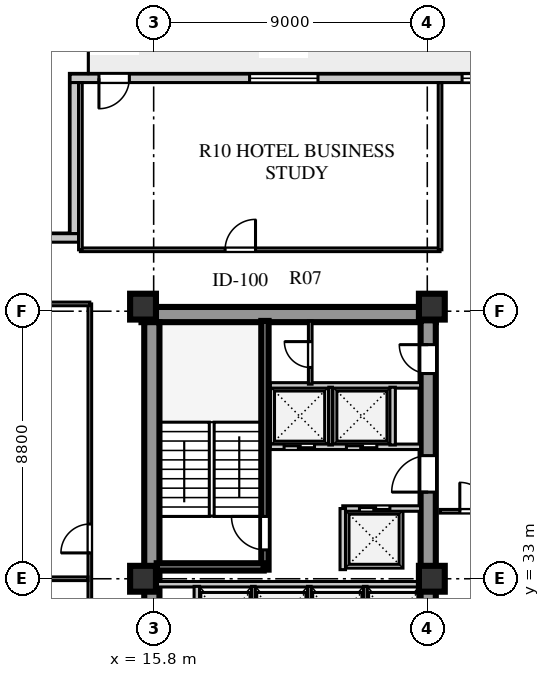
"""IFC4 building model, lengths in metres.
Left out: names, types, materials, properties, quantities, classifications, styles, units other than length and angle.
Written with IfcOpenShell. Run it as: python <this file> out.ifc"""

import sys

from ifc_helpers import new_model, si_unit, direction, frame, frame_2d, origin, origin_2d, place, context, subcontext, project, spatial, rectangle, extrude, element, fill, save


model = new_model("IFC4")
c1 = context("Model", 3, precision=1e-05, world=origin(), true_north=direction((0.0, 1.0)))
c2 = subcontext(c1, "Body", "Model", "MODEL_VIEW")
j1 = project(units=[si_unit("LENGTHUNIT", "METRE"), si_unit("PLANEANGLEUNIT", "RADIAN")], contexts=[c1])
p1 = place(None, origin())
s1 = spatial("IfcSite", under=j1, at=p1, CompositionType="ELEMENT")
p2 = place(p1, origin())
s2 = spatial("IfcBuilding", under=s1, at=p2, CompositionType="ELEMENT")
p3 = place(p2, frame((0.0, 0.0, 181.0)))
s3 = spatial("IfcBuildingStorey", under=s2, at=p3, CompositionType="ELEMENT", Elevation=181.0)
p4 = place(p3, frame((15.4, 41.69, 0.0), z_axis=(0.0, 0.0, 1.0), x_axis=(1.0, 0.0, 0.0)))
e1 = element("IfcWall", 1, at=p4, inside=s3, PredefinedType="SHEAR", context=c2, shape_type="SweptSolid", body=[
    extrude(rectangle(XDim=9.68, YDim=0.5, at=frame_2d((4.84, 0.0))), origin(), (0.0, 0.0, 1.0), 3.6),
])
p5 = place(p3, frame((15.74, 15.81, 0.0), z_axis=(0.0, 0.0, 1.0), x_axis=(0.0, 1.0, 0.0)))
e2 = element("IfcWall", 2, at=p5, inside=s3, PredefinedType="SHEAR", context=c2, shape_type="SweptSolid", body=[
    extrude(rectangle(XDim=25.63, YDim=0.5, at=frame_2d((12.815, 0.0))), origin(), (0.0, 0.0, 1.0), 3.6),
])
p6 = place(p3, frame((24.83, 15.74, 0.0), z_axis=(0.0, 0.0, 1.0), x_axis=(0.0, 1.0, 0.0)))
e3 = element("IfcWall", 3, at=p6, inside=s3, PredefinedType="SHEAR", context=c2, shape_type="SweptSolid", body=[
    extrude(rectangle(XDim=25.76, YDim=0.5, at=frame_2d((12.88, 0.0))), origin(), (0.0, 0.0, 1.0), 3.6),
])
p7 = place(p6, frame((1.61, 0.0, 0.0)))
e4 = element("IfcOpeningElement", 4, at=p7, cuts=e3, PredefinedType="OPENING", context=c2, shape_type="SweptSolid", body=[
    extrude(rectangle(XDim=1.2, YDim=2.1, at=frame_2d((0.6, 1.05))), frame((0.0, 0.26, 0.0), z_axis=(0.0, -1.0, 0.0), x_axis=(1.0, 0.0, 0.0)), (0.0, 0.0, 1.0), 0.52),
])
p8 = place(p6, frame((6.78, 0.0, 0.0)))
e5 = element("IfcOpeningElement", 5, at=p8, cuts=e3, PredefinedType="OPENING", context=c2, shape_type="SweptSolid", body=[
    extrude(rectangle(XDim=0.85, YDim=2.06, at=frame_2d((0.425, 1.03))), frame((0.0, 0.26, 0.0), z_axis=(0.0, -1.0, 0.0), x_axis=(1.0, 0.0, 0.0)), (0.0, 0.0, 1.0), 0.52),
])
p9 = place(p6, frame((12.11, 0.0, 0.0)))
e6 = element("IfcOpeningElement", 6, at=p9, cuts=e3, PredefinedType="OPENING", context=c2, shape_type="SweptSolid", body=[
    extrude(rectangle(XDim=1.5, YDim=2.12, at=frame_2d((0.75, 1.06))), frame((0.0, 0.26, 0.0), z_axis=(0.0, -1.0, 0.0), x_axis=(1.0, 0.0, 0.0)), (0.0, 0.0, 1.0), 0.52),
])
p10 = place(p6, frame((20.11, 0.0, 0.0)))
e7 = element("IfcOpeningElement", 7, at=p10, cuts=e3, PredefinedType="OPENING", context=c2, shape_type="SweptSolid", body=[
    extrude(rectangle(XDim=1.2, YDim=2.12, at=frame_2d((0.6, 1.06))), frame((0.0, 0.26, 0.0), z_axis=(0.0, -1.0, 0.0), x_axis=(1.0, 0.0, 0.0)), (0.0, 0.0, 1.0), 0.52),
])
p11 = place(p6, frame((24.01, 0.0, 0.0)))
e8 = element("IfcOpeningElement", 8, at=p11, cuts=e3, PredefinedType="OPENING", context=c2, shape_type="SweptSolid", body=[
    extrude(rectangle(XDim=0.95, YDim=2.1, at=frame_2d((0.475, 1.05))), frame((0.0, 0.26, 0.0), z_axis=(0.0, -1.0, 0.0), x_axis=(1.0, 0.0, 0.0)), (0.0, 0.0, 1.0), 0.52),
])
for number, where, z_axis, x_axis in (
    (9, (15.45, 33.0, 0.0), (0.0, 0.0, 1.0), (1.0, 0.0, 0.0)),
    (10, (15.45, 41.95, 0.0), (0.0, 0.0, 1.0), (1.0, 0.0, 0.0)),
    (11, (24.95, 33.0, 0.0), (0.0, 0.0, 1.0), (1.0, 0.0, 0.0)),
    (12, (24.95, 41.95, 0.0), (0.0, 0.0, 1.0), (1.0, 0.0, 0.0)),
):
    element("IfcColumn", number, at=place(p3, frame(where, z_axis=z_axis, x_axis=x_axis)), inside=s3, PredefinedType="COLUMN", context=c2, shape_type="SweptSolid", body=[
        extrude(rectangle(XDim=0.85, YDim=0.85, at=origin_2d()), origin(), (0.0, 0.0, 1.0), 3.6),
    ])
p12 = place(p3, frame((45.55, 49.46, 0.0), z_axis=(0.0, 0.0, 1.0), x_axis=(-1.0, 0.0, 0.0)))
e13 = element("IfcWall", 13, at=p12, inside=s3, PredefinedType="STANDARD", context=c2, shape_type="SweptSolid", body=[
    extrude(rectangle(XDim=32.5, YDim=0.28, at=frame_2d((16.25, 0.0))), origin(), (0.0, 0.0, 1.0), 3.6),
])
p13 = place(p12, frame((30.55, 0.0, 0.0)))
e14 = element("IfcOpeningElement", 14, at=p13, cuts=e13, PredefinedType="OPENING", context=c2, shape_type="SweptSolid", body=[
    extrude(rectangle(XDim=1.0, YDim=2.05, at=frame_2d((0.5, 1.025))), frame((0.0, 0.15, 0.0), z_axis=(0.0, -1.0, 0.0), x_axis=(1.0, 0.0, 0.0)), (0.0, 0.0, 1.0), 0.3),
])
p14 = place(p12, frame((24.345, 0.0, 0.8)))
e15 = element("IfcOpeningElement", 15, at=p14, cuts=e13, PredefinedType="OPENING", context=c2, shape_type="SweptSolid", body=[
    extrude(rectangle(XDim=2.25, YDim=2.0, at=frame_2d((1.125, 1.0))), frame((0.0, 0.15, 0.0), z_axis=(0.0, -1.0, 0.0), x_axis=(1.0, 0.0, 0.0)), (0.0, 0.0, 1.0), 0.3),
])
p15 = place(p12, frame((18.405, 0.0, 0.8)))
e16 = element("IfcOpeningElement", 16, at=p15, cuts=e13, PredefinedType="OPENING", context=c2, shape_type="SweptSolid", body=[
    extrude(rectangle(XDim=1.2, YDim=1.75, at=frame_2d((0.6, 0.875))), frame((0.0, 0.15, 0.0), z_axis=(0.0, -1.0, 0.0), x_axis=(1.0, 0.0, 0.0)), (0.0, 0.0, 1.0), 0.3),
])
p16 = place(p12, frame((16.015, 0.0, 0.8)))
e17 = element("IfcOpeningElement", 17, at=p16, cuts=e13, PredefinedType="OPENING", context=c2, shape_type="SweptSolid", body=[
    extrude(rectangle(XDim=1.2, YDim=1.75, at=frame_2d((0.6, 0.875))), frame((0.0, 0.15, 0.0), z_axis=(0.0, -1.0, 0.0), x_axis=(1.0, 0.0, 0.0)), (0.0, 0.0, 1.0), 0.3),
])
p17 = place(p12, frame((12.59, 0.0, 0.8)))
e18 = element("IfcOpeningElement", 18, at=p17, cuts=e13, PredefinedType="OPENING", context=c2, shape_type="SweptSolid", body=[
    extrude(rectangle(XDim=1.2, YDim=1.75, at=frame_2d((0.6, 0.875))), frame((0.0, 0.15, 0.0), z_axis=(0.0, -1.0, 0.0), x_axis=(1.0, 0.0, 0.0)), (0.0, 0.0, 1.0), 0.3),
])
p18 = place(p12, frame((6.58, 0.0, 0.8)))
e19 = element("IfcOpeningElement", 19, at=p18, cuts=e13, PredefinedType="OPENING", context=c2, shape_type="SweptSolid", body=[
    extrude(rectangle(XDim=2.4, YDim=2.05, at=frame_2d((1.2, 1.025))), frame((0.0, 0.15, 0.0), z_axis=(0.0, -1.0, 0.0), x_axis=(1.0, 0.0, 0.0)), (0.0, 0.0, 1.0), 0.3),
])
p19 = place(p12, frame((1.37, 0.0, 0.8)))
e20 = element("IfcOpeningElement", 20, at=p19, cuts=e13, PredefinedType="OPENING", context=c2, shape_type="SweptSolid", body=[
    extrude(rectangle(XDim=2.1, YDim=1.95, at=frame_2d((1.05, 0.975))), frame((0.0, 0.15, 0.0), z_axis=(0.0, -1.0, 0.0), x_axis=(1.0, 0.0, 0.0)), (0.0, 0.0, 1.0), 0.3),
])
p20 = place(p3, frame((13.19, 49.32, 0.0), z_axis=(0.0, 0.0, 1.0), x_axis=(0.0, -1.0, 0.0)))
e21 = element("IfcWall", 21, at=p20, inside=s3, PredefinedType="STANDARD", context=c2, shape_type="SweptSolid", body=[
    extrude(rectangle(XDim=4.97, YDim=0.28, at=frame_2d((2.485, 0.0))), origin(), (0.0, 0.0, 1.0), 3.6),
])
p21 = place(p3, frame((13.33, 44.21, 0.0), z_axis=(0.0, 0.0, 1.0), x_axis=(-1.0, 0.0, 0.0)))
e22 = element("IfcWall", 22, at=p21, inside=s3, PredefinedType="STANDARD", context=c2, shape_type="SweptSolid", body=[
    extrude(rectangle(XDim=5.53, YDim=0.28, at=frame_2d((2.765, 0.0))), origin(), (0.0, 0.0, 1.0), 3.6),
])
p22 = place(p3, frame((15.9, 32.82, 0.0), z_axis=(0.0, 0.0, 1.0), x_axis=(1.0, 0.0, 0.0)))
e23 = element("IfcWall", 23, at=p22, inside=s3, PredefinedType="SOLIDWALL", context=c2, shape_type="SweptSolid", body=[
    extrude(rectangle(XDim=8.68, YDim=0.18, at=frame_2d((4.34, 0.0))), origin(), (0.0, 0.0, 1.0), 2.95),
])
p23 = place(p3, frame((17.22, 30.7, 0.0), z_axis=(0.0, 0.0, 1.0), x_axis=(0.0, 1.0, 0.0)))
e24 = element("IfcWall", 24, at=p23, inside=s3, PredefinedType="SOLIDWALL", context=c2, shape_type="SweptSolid", body=[
    extrude(rectangle(XDim=2.05, YDim=0.18, at=frame_2d((1.025, 0.0))), origin(), (0.0, 0.0, 1.0), 3.6),
])
for number, where, z_axis, x_axis in (
    (25, (19.08, 30.7, 0.0), (0.0, 0.0, 1.0), (0.0, 1.0, 0.0)),
    (26, (20.92, 30.7, 0.0), (0.0, 0.0, 1.0), (0.0, 1.0, 0.0)),
    (27, (22.76, 30.7, 0.0), (0.0, 0.0, 1.0), (0.0, 1.0, 0.0)),
):
    element("IfcWall", number, at=place(p3, frame(where, z_axis=z_axis, x_axis=x_axis)), inside=s3, PredefinedType="PARTITIONING", context=c2, shape_type="SweptSolid", body=[
        extrude(rectangle(XDim=2.05, YDim=0.12, at=frame_2d((1.025, 0.0))), origin(), (0.0, 0.0, 1.0), 3.6),
    ])
p24 = place(p3, frame((19.46, 33.3, 0.0), z_axis=(0.0, 0.0, 1.0), x_axis=(0.0, 1.0, 0.0)))
e28 = element("IfcWall", 28, at=p24, inside=s3, PredefinedType="SHEAR", context=c2, shape_type="SweptSolid", body=[
    extrude(rectangle(XDim=8.18, YDim=0.24, at=frame_2d((4.09, 0.0))), origin(), (0.0, 0.0, 1.0), 3.85),
])
p25 = place(p24, frame((0.65, 0.0, 0.0)))
e29 = element("IfcOpeningElement", 29, at=p25, cuts=e28, PredefinedType="OPENING", context=c2, shape_type="SweptSolid", body=[
    extrude(rectangle(XDim=1.1, YDim=2.1, at=frame_2d((0.55, 1.05))), frame((0.0, 0.13, 0.0), z_axis=(0.0, -1.0, 0.0), x_axis=(1.0, 0.0, 0.0)), (0.0, 0.0, 1.0), 0.26),
])
p26 = place(p3, frame((15.9, 33.39, 0.0), z_axis=(0.0, 0.0, 1.0), x_axis=(1.0, 0.0, 0.0)))
e30 = element("IfcWall", 30, at=p26, inside=s3, PredefinedType="SHEAR", context=c2, shape_type="SweptSolid", body=[
    extrude(rectangle(XDim=3.52, YDim=0.24, at=frame_2d((1.76, 0.0))), origin(), (0.0, 0.0, 1.0), 3.85),
])
p27 = place(p3, frame((22.02, 35.31, 0.0), z_axis=(0.0, 0.0, 1.0), x_axis=(1.0, 0.0, 0.0)))
e31 = element("IfcWall", 31, at=p27, inside=s3, PredefinedType="SOLIDWALL", context=c2, shape_type="SweptSolid", body=[
    extrude(rectangle(XDim=2.56, YDim=0.18, at=frame_2d((1.28, 0.0))), origin(), (0.0, 0.0, 1.0), 3.6),
])
p28 = place(p27, frame((0.55, 0.0, 0.0)))
e32 = element("IfcOpeningElement", 32, at=p28, cuts=e31, PredefinedType="OPENING", context=c2, shape_type="SweptSolid", body=[
    extrude(rectangle(XDim=1.0, YDim=2.1, at=frame_2d((0.5, 1.05))), frame((0.0, 0.1, 0.0), z_axis=(0.0, -1.0, 0.0), x_axis=(1.0, 0.0, 0.0)), (0.0, 0.0, 1.0), 0.2),
])
p29 = place(p3, frame((22.02, 33.3, 0.0), z_axis=(0.0, 0.0, 1.0), x_axis=(0.0, 1.0, 0.0)))
e33 = element("IfcWall", 33, at=p29, inside=s3, PredefinedType="SOLIDWALL", context=c2, shape_type="SweptSolid", body=[
    extrude(rectangle(XDim=2.01, YDim=0.18, at=frame_2d((1.005, 0.0))), origin(), (0.0, 0.0, 1.0), 3.6),
])
p30 = place(p3, frame((19.64, 37.34, 0.0), z_axis=(0.0, 0.0, 1.0), x_axis=(1.0, 0.0, 0.0)))
e34 = element("IfcWall", 34, at=p30, inside=s3, PredefinedType="SOLIDWALL", context=c2, shape_type="SweptSolid", body=[
    extrude(rectangle(XDim=4.94, YDim=0.18, at=frame_2d((2.47, 0.0))), origin(), (0.0, 0.0, 1.0), 3.6),
])
p31 = place(p30, frame((0.45, 0.0, 0.0)))
e35 = element("IfcOpeningElement", 35, at=p31, cuts=e34, PredefinedType="OPENING", context=c2, shape_type="SweptSolid", body=[
    extrude(rectangle(XDim=1.0, YDim=2.1, at=frame_2d((0.5, 1.05))), frame((0.0, 0.1, 0.0), z_axis=(0.0, -1.0, 0.0), x_axis=(1.0, 0.0, 0.0)), (0.0, 0.0, 1.0), 0.2),
])
p32 = place(p30, frame((2.5, 0.0, 0.0)))
e36 = element("IfcOpeningElement", 36, at=p32, cuts=e34, PredefinedType="OPENING", context=c2, shape_type="SweptSolid", body=[
    extrude(rectangle(XDim=1.0, YDim=2.1, at=frame_2d((0.5, 1.05))), frame((0.0, 0.1, 0.0), z_axis=(0.0, -1.0, 0.0), x_axis=(1.0, 0.0, 0.0)), (0.0, 0.0, 1.0), 0.2),
])
p33 = place(p3, frame((19.64, 39.36, 0.0), z_axis=(0.0, 0.0, 1.0), x_axis=(1.0, 0.0, 0.0)))
e37 = element("IfcWall", 37, at=p33, inside=s3, PredefinedType="SOLIDWALL", context=c2, shape_type="SweptSolid", body=[
    extrude(rectangle(XDim=4.94, YDim=0.18, at=frame_2d((2.47, 0.0))), origin(), (0.0, 0.0, 1.0), 3.6),
])
p34 = place(p3, frame((21.62, 37.4, 0.0), z_axis=(0.0, 0.0, 1.0), x_axis=(0.0, 1.0, 0.0)))
e38 = element("IfcWall", 38, at=p34, inside=s3, PredefinedType="PARTITIONING", context=c2, shape_type="SweptSolid", body=[
    extrude(rectangle(XDim=1.9, YDim=0.12, at=frame_2d((0.95, 0.0))), origin(), (0.0, 0.0, 1.0), 3.6),
])
p35 = place(p3, frame((23.66, 37.4, 0.0), z_axis=(0.0, 0.0, 1.0), x_axis=(0.0, 1.0, 0.0)))
e39 = element("IfcWall", 39, at=p35, inside=s3, PredefinedType="SOLIDWALL", context=c2, shape_type="SweptSolid", body=[
    extrude(rectangle(XDim=1.9, YDim=0.18, at=frame_2d((0.95, 0.0))), origin(), (0.0, 0.0, 1.0), 3.6),
])
p36 = place(p3, frame((20.95, 39.4, 0.0), z_axis=(0.0, 0.0, 1.0), x_axis=(0.0, 1.0, 0.0)))
e40 = element("IfcWall", 40, at=p36, inside=s3, PredefinedType="PARTITIONING", context=c2, shape_type="SweptSolid", body=[
    extrude(rectangle(XDim=2.08, YDim=0.12, at=frame_2d((1.04, 0.0))), origin(), (0.0, 0.0, 1.0), 3.6),
])
p37 = place(p36, frame((0.55, 0.0, 0.0)))
e41 = element("IfcOpeningElement", 41, at=p37, cuts=e40, PredefinedType="OPENING", context=c2, shape_type="SweptSolid", body=[
    extrude(rectangle(XDim=0.85, YDim=2.06, at=frame_2d((0.425, 1.03))), frame((0.0, 0.07, 0.0), z_axis=(0.0, -1.0, 0.0), x_axis=(1.0, 0.0, 0.0)), (0.0, 0.0, 1.0), 0.14),
])
p38 = place(p3, frame((25.22, 35.22, 0.0), z_axis=(0.0, 0.0, 1.0), x_axis=(1.0, 0.0, 0.0)))
e42 = element("IfcWall", 42, at=p38, inside=s3, PredefinedType="PARTITIONING", context=c2, shape_type="SweptSolid", body=[
    extrude(rectangle(XDim=9.5, YDim=0.12, at=frame_2d((4.75, 0.0))), origin(), (0.0, 0.0, 1.0), 3.6),
])
p39 = place(p38, frame((0.65, 0.0, 0.0)))
e43 = element("IfcOpeningElement", 43, at=p39, cuts=e42, PredefinedType="OPENING", context=c2, shape_type="SweptSolid", body=[
    extrude(rectangle(XDim=0.95, YDim=2.1, at=frame_2d((0.475, 1.05))), frame((0.0, 0.07, 0.0), z_axis=(0.0, -1.0, 0.0), x_axis=(1.0, 0.0, 0.0)), (0.0, 0.0, 1.0), 0.14),
])
p40 = place(p38, frame((5.4, 0.0, 0.0)))
e44 = element("IfcOpeningElement", 44, at=p40, cuts=e42, PredefinedType="OPENING", context=c2, shape_type="SweptSolid", body=[
    extrude(rectangle(XDim=1.05, YDim=2.1, at=frame_2d((0.525, 1.05))), frame((0.0, 0.07, 0.0), z_axis=(0.0, -1.0, 0.0), x_axis=(1.0, 0.0, 0.0)), (0.0, 0.0, 1.0), 0.14),
])
p41 = place(p3, frame((13.7, 15.16, 0.0), z_axis=(0.0, 0.0, 1.0), x_axis=(0.0, 1.0, 0.0)))
e45 = element("IfcWall", 45, at=p41, inside=s3, PredefinedType="PARTITIONING", context=c2, shape_type="SweptSolid", body=[
    extrude(rectangle(XDim=26.88, YDim=0.12, at=frame_2d((13.44, 0.0))), origin(), (0.0, 0.0, 1.0), 3.6),
])
p42 = place(p41, frame((0.91, 0.0, 0.0)))
e46 = element("IfcOpeningElement", 46, at=p42, cuts=e45, PredefinedType="OPENING", context=c2, shape_type="SweptSolid", body=[
    extrude(rectangle(XDim=0.95, YDim=2.1, at=frame_2d((0.475, 1.05))), frame((0.0, 0.07, 0.0), z_axis=(0.0, -1.0, 0.0), x_axis=(1.0, 0.0, 0.0)), (0.0, 0.0, 1.0), 0.14),
])
p43 = place(p41, frame((9.84, 0.0, 0.0)))
e47 = element("IfcOpeningElement", 47, at=p43, cuts=e45, PredefinedType="OPENING", context=c2, shape_type="SweptSolid", body=[
    extrude(rectangle(XDim=0.95, YDim=2.1, at=frame_2d((0.475, 1.05))), frame((0.0, 0.07, 0.0), z_axis=(0.0, -1.0, 0.0), x_axis=(1.0, 0.0, 0.0)), (0.0, 0.0, 1.0), 0.14),
])
p44 = place(p41, frame((18.69, 0.0, 0.0)))
e48 = element("IfcOpeningElement", 48, at=p44, cuts=e45, PredefinedType="OPENING", context=c2, shape_type="SweptSolid", body=[
    extrude(rectangle(XDim=0.95, YDim=2.1, at=frame_2d((0.475, 1.05))), frame((0.0, 0.07, 0.0), z_axis=(0.0, -1.0, 0.0), x_axis=(1.0, 0.0, 0.0)), (0.0, 0.0, 1.0), 0.14),
])
p45 = place(p3, frame((8.08, 42.04, 0.0), z_axis=(0.0, 0.0, 1.0), x_axis=(1.0, 0.0, 0.0)))
e49 = element("IfcWall", 49, at=p45, inside=s3, PredefinedType="PARTITIONING", context=c2, shape_type="SweptSolid", body=[
    extrude(rectangle(XDim=5.62, YDim=0.12, at=frame_2d((2.81, 0.0))), origin(), (0.0, 0.0, 1.0), 3.15),
])
p46 = place(p3, frame((13.39, 43.82, 0.0), z_axis=(0.0, 0.0, 1.0), x_axis=(1.0, 0.0, 0.0)))
e50 = element("IfcWall", 50, at=p46, inside=s3, PredefinedType="PARTITIONING", context=c2, shape_type="SweptSolid", body=[
    extrude(rectangle(XDim=11.83, YDim=0.12, at=frame_2d((5.915, 0.0))), origin(), (0.0, 0.0, 1.0), 3.6),
])
p47 = place(p46, frame((4.76, 0.0, 0.0)))
e51 = element("IfcOpeningElement", 51, at=p47, cuts=e50, PredefinedType="OPENING", context=c2, shape_type="SweptSolid", body=[
    extrude(rectangle(XDim=1.0, YDim=2.08, at=frame_2d((0.5, 1.04))), frame((0.0, 0.07, 0.0), z_axis=(0.0, -1.0, 0.0), x_axis=(1.0, 0.0, 0.0)), (0.0, 0.0, 1.0), 0.14),
])
p48 = place(p3, frame((13.39, 43.82, 0.0), z_axis=(0.0, 0.0, 1.0), x_axis=(0.0, 1.0, 0.0)))
e52 = element("IfcWall", 52, at=p48, inside=s3, PredefinedType="PARTITIONING", context=c2, shape_type="SweptSolid", body=[
    extrude(rectangle(XDim=5.5, YDim=0.12, at=frame_2d((2.75, 0.0))), origin(), (0.0, 0.0, 1.0), 3.6),
])
p49 = place(p3, frame((25.22, 43.82, 0.0), z_axis=(0.0, 0.0, 1.0), x_axis=(0.0, 1.0, 0.0)))
e53 = element("IfcWall", 53, at=p49, inside=s3, PredefinedType="PARTITIONING", context=c2, shape_type="SweptSolid", body=[
    extrude(rectangle(XDim=5.5, YDim=0.12, at=frame_2d((2.75, 0.0))), origin(), (0.0, 0.0, 1.0), 3.15),
])
p50 = place(p3, frame((8.08, 33.0, 0.0), z_axis=(0.0, 0.0, 1.0), x_axis=(1.0, 0.0, 0.0)))
e54 = element("IfcWall", 54, at=p50, inside=s3, PredefinedType="PARTITIONING", context=c2, shape_type="SweptSolid", body=[
    extrude(rectangle(XDim=5.56, YDim=0.12, at=frame_2d((2.78, 0.0))), origin(), (0.0, 0.0, 1.0), 3.15),
])
p51 = place(p13, frame((1.0, 0.0, 0.0), z_axis=(0.0, 0.0, 1.0), x_axis=(-1.0, 0.0, 0.0)))
e55 = element("IfcDoor", 55, at=p51, inside=s3, OperationType="SINGLE_SWING_LEFT", PredefinedType="DOOR", context=c2, shape_type="SweptSolid", body=[
    extrude(rectangle(XDim=1.0, YDim=2.05, at=frame_2d((0.5, 1.025))), frame((0.0, 0.025, 0.0), z_axis=(0.0, -1.0, 0.0), x_axis=(1.0, 0.0, 0.0)), (0.0, 0.0, 1.0), 0.05),
])
fill(e14, e55)
p52 = place(p14, origin())
e56 = element("IfcWindow", 56, at=p52, inside=s3, PartitioningType="SINGLE_PANEL", PredefinedType="WINDOW", context=c2, shape_type="SweptSolid", body=[
    extrude(rectangle(XDim=2.25, YDim=2.0, at=frame_2d((1.125, 1.0))), frame((0.0, 0.03, 0.0), z_axis=(0.0, -1.0, 0.0), x_axis=(1.0, 0.0, 0.0)), (0.0, 0.0, 1.0), 0.06),
])
fill(e15, e56)
p53 = place(p15, origin())
e57 = element("IfcWindow", 57, at=p53, inside=s3, PartitioningType="SINGLE_PANEL", PredefinedType="WINDOW", context=c2, shape_type="SweptSolid", body=[
    extrude(rectangle(XDim=1.2, YDim=1.75, at=frame_2d((0.6, 0.875))), frame((0.0, 0.03, 0.0), z_axis=(0.0, -1.0, 0.0), x_axis=(1.0, 0.0, 0.0)), (0.0, 0.0, 1.0), 0.06),
])
fill(e16, e57)
p54 = place(p25, origin())
e58 = element("IfcDoor", 58, at=p54, inside=s3, OperationType="SINGLE_SWING_RIGHT", PredefinedType="DOOR", context=c2, shape_type="SweptSolid", body=[
    extrude(rectangle(XDim=1.1, YDim=2.1, at=frame_2d((0.55, 1.05))), frame((0.0, 0.025, 0.0), z_axis=(0.0, -1.0, 0.0), x_axis=(1.0, 0.0, 0.0)), (0.0, 0.0, 1.0), 0.05),
])
fill(e29, e58)
p55 = place(p10, frame((1.2, 0.0, 0.0), z_axis=(0.0, 0.0, 1.0), x_axis=(-1.0, 0.0, 0.0)))
e59 = element("IfcDoor", 59, at=p55, inside=s3, OperationType="SINGLE_SWING_RIGHT", PredefinedType="DOOR", context=c2, shape_type="SweptSolid", body=[
    extrude(rectangle(XDim=1.2, YDim=2.12, at=frame_2d((0.6, 1.06))), frame((0.0, 0.025, 0.0), z_axis=(0.0, -1.0, 0.0), x_axis=(1.0, 0.0, 0.0)), (0.0, 0.0, 1.0), 0.05),
])
fill(e7, e59)
p56 = place(p31, frame((1.0, 0.0, 0.0), z_axis=(0.0, 0.0, 1.0), x_axis=(-1.0, 0.0, 0.0)))
e60 = element("IfcDoor", 60, at=p56, inside=s3, OperationType="DOUBLE_DOOR_SLIDING", PredefinedType="DOOR", context=c2, shape_type="SweptSolid", body=[
    extrude(rectangle(XDim=1.0, YDim=2.1, at=frame_2d((0.5, 1.05))), frame((0.0, 0.025, 0.0), z_axis=(0.0, -1.0, 0.0), x_axis=(1.0, 0.0, 0.0)), (0.0, 0.0, 1.0), 0.05),
])
fill(e35, e60)
p57 = place(p32, frame((1.0, 0.0, 0.0), z_axis=(0.0, 0.0, 1.0), x_axis=(-1.0, 0.0, 0.0)))
e61 = element("IfcDoor", 61, at=p57, inside=s3, OperationType="DOUBLE_DOOR_SLIDING", PredefinedType="DOOR", context=c2, shape_type="SweptSolid", body=[
    extrude(rectangle(XDim=1.0, YDim=2.1, at=frame_2d((0.5, 1.05))), frame((0.0, 0.025, 0.0), z_axis=(0.0, -1.0, 0.0), x_axis=(1.0, 0.0, 0.0)), (0.0, 0.0, 1.0), 0.05),
])
fill(e36, e61)
p58 = place(p28, origin())
e62 = element("IfcDoor", 62, at=p58, inside=s3, OperationType="DOUBLE_DOOR_SLIDING", PredefinedType="DOOR", context=c2, shape_type="SweptSolid", body=[
    extrude(rectangle(XDim=1.0, YDim=2.1, at=frame_2d((0.5, 1.05))), frame((0.0, 0.025, 0.0), z_axis=(0.0, -1.0, 0.0), x_axis=(1.0, 0.0, 0.0)), (0.0, 0.0, 1.0), 0.05),
])
fill(e32, e62)
p59 = place(p37, origin())
e63 = element("IfcDoor", 63, at=p59, inside=s3, OperationType="SINGLE_SWING_RIGHT", PredefinedType="DOOR", context=c2, shape_type="SweptSolid", body=[
    extrude(rectangle(XDim=0.85, YDim=2.06, at=frame_2d((0.425, 1.03))), frame((0.0, 0.025, 0.0), z_axis=(0.0, -1.0, 0.0), x_axis=(1.0, 0.0, 0.0)), (0.0, 0.0, 1.0), 0.05),
])
fill(e41, e63)
p60 = place(p11, frame((0.95, 0.0, 0.0), z_axis=(0.0, 0.0, 1.0), x_axis=(-1.0, 0.0, 0.0)))
e64 = element("IfcDoor", 64, at=p60, inside=s3, OperationType="SINGLE_SWING_LEFT", PredefinedType="DOOR", context=c2, shape_type="SweptSolid", body=[
    extrude(rectangle(XDim=0.95, YDim=2.1, at=frame_2d((0.475, 1.05))), frame((0.0, 0.025, 0.0), z_axis=(0.0, -1.0, 0.0), x_axis=(1.0, 0.0, 0.0)), (0.0, 0.0, 1.0), 0.05),
])
fill(e8, e64)
p61 = place(p47, origin())
e65 = element("IfcDoor", 65, at=p61, inside=s3, OperationType="SINGLE_SWING_RIGHT", PredefinedType="DOOR", context=c2, shape_type="SweptSolid", body=[
    extrude(rectangle(XDim=1.0, YDim=2.08, at=frame_2d((0.5, 1.04))), frame((0.0, 0.025, 0.0), z_axis=(0.0, -1.0, 0.0), x_axis=(1.0, 0.0, 0.0)), (0.0, 0.0, 1.0), 0.05),
])
fill(e51, e65)
p62 = place(p44, origin())
e66 = element("IfcDoor", 66, at=p62, inside=s3, OperationType="SINGLE_SWING_LEFT", PredefinedType="DOOR", context=c2, shape_type="SweptSolid", body=[
    extrude(rectangle(XDim=0.95, YDim=2.1, at=frame_2d((0.475, 1.05))), frame((0.0, 0.025, 0.0), z_axis=(0.0, -1.0, 0.0), x_axis=(1.0, 0.0, 0.0)), (0.0, 0.0, 1.0), 0.05),
])
fill(e48, e66)
p63 = place(p39, origin())
e67 = element("IfcDoor", 67, at=p63, inside=s3, OperationType="SINGLE_SWING_LEFT", PredefinedType="DOOR", context=c2, shape_type="SweptSolid", body=[
    extrude(rectangle(XDim=0.95, YDim=2.1, at=frame_2d((0.475, 1.05))), frame((0.0, 0.025, 0.0), z_axis=(0.0, -1.0, 0.0), x_axis=(1.0, 0.0, 0.0)), (0.0, 0.0, 1.0), 0.05),
])
fill(e43, e67)
save(model, sys.argv[1])
